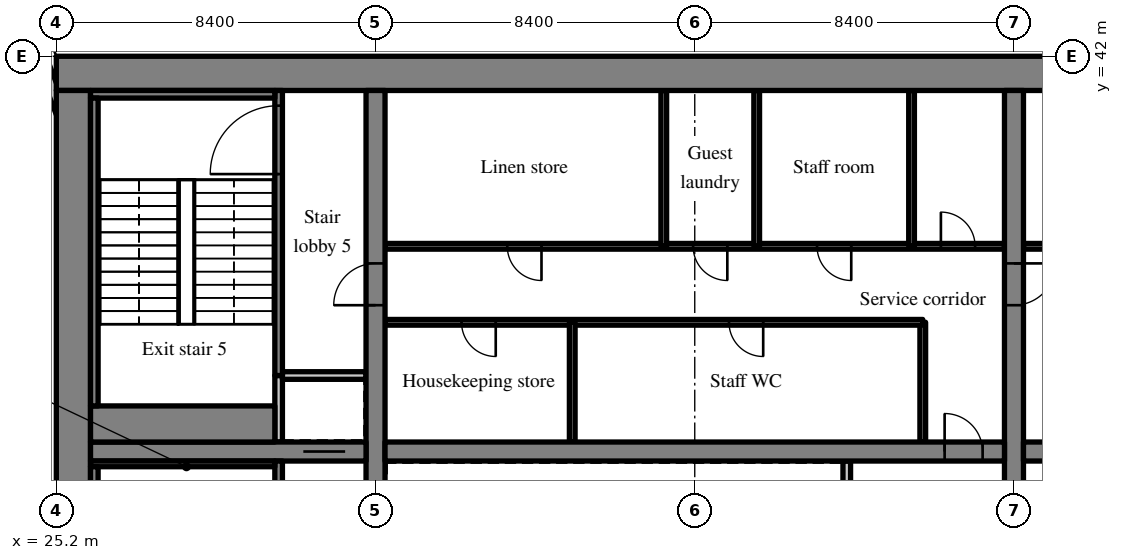
"""IFC4 building model, lengths in metres.
Left out: names, types, materials, properties, quantities, classifications, styles, units other than length and angle.
Written with IfcOpenShell. Run it as: python <this file> out.ifc"""

import sys

from ifc_helpers import new_model, si_unit, direction, frame, frame_2d, origin, place, context, subcontext, project, spatial, rectangle, extrude, source, transform, mapped, element, fill, save


model = new_model("IFC4")
c1 = context("Model", 3, precision=1e-05, world=origin(), true_north=direction((0.0, 1.0)))
c2 = subcontext(c1, "Body", "Model", "MODEL_VIEW")
j1 = project(units=[si_unit("LENGTHUNIT", "METRE"), si_unit("PLANEANGLEUNIT", "RADIAN")], contexts=[c1])
p1 = place(None, origin())
s1 = spatial("IfcSite", under=j1, at=p1, CompositionType="ELEMENT")
p2 = place(p1, origin())
s2 = spatial("IfcBuilding", under=s1, at=p2, CompositionType="ELEMENT")
p3 = place(p2, frame((0.0, 0.0, 133.2)))
s3 = spatial("IfcBuildingStorey", under=s2, at=p3, CompositionType="ELEMENT", Elevation=133.2)
m1 = source(origin(), c2, "Body", "SweptSolid", [
    extrude(rectangle(XDim=50.4, YDim=0.9, at=frame_2d((25.2, 0.0))), origin(), (0.0, 0.0, 1.0), 3.52),
])
p4 = place(p3, frame((25.2, 41.55, 0.0), z_axis=(0.0, 0.0, 1.0), x_axis=(1.0, 0.0, 0.0)))
e1 = element("IfcWall", 1, at=p4, inside=s3, PredefinedType="SHEAR", context=c2, shape_type="MappedRepresentation", body=[
    mapped(m1, transform((0.0, 0.0, 0.0), scale=1.0)),
])
m2 = source(origin(), c2, "Body", "SweptSolid", [
    extrude(rectangle(XDim=18.2, YDim=0.9, at=frame_2d((9.1, 0.0))), origin(), (0.0, 0.0, 1.0), 3.52),
])
p5 = place(p3, frame((25.65, 22.9, 0.0), z_axis=(0.0, 0.0, 1.0), x_axis=(0.0, 1.0, 0.0)))
e2 = element("IfcWall", 2, at=p5, inside=s3, PredefinedType="SHEAR", context=c2, shape_type="MappedRepresentation", body=[
    mapped(m2, transform((0.0, 0.0, 0.0), scale=1.0)),
])
m3 = source(origin(), c2, "Body", "SweptSolid", [
    extrude(rectangle(XDim=18.2, YDim=0.5, at=frame_2d((9.1, 0.0))), origin(), (0.0, 0.0, 1.0), 3.52),
])
p6 = place(p3, frame((33.6, 22.9, 0.0), z_axis=(0.0, 0.0, 1.0), x_axis=(0.0, 1.0, 0.0)))
e3 = element("IfcWall", 3, at=p6, inside=s3, PredefinedType="SHEAR", context=c2, shape_type="MappedRepresentation", body=[
    mapped(m3, transform((0.0, 0.0, 0.0), scale=1.0)),
])
m4 = source(origin(), c2, "Body", "SweptSolid", [
    extrude(rectangle(XDim=1.1, YDim=2.1, at=frame_2d((0.55, 1.05))), frame((0.0, 0.26, 0.0), z_axis=(0.0, -1.0, 0.0), x_axis=(1.0, 0.0, 0.0)), (0.0, 0.0, 1.0), 0.52),
])
p7 = place(p6, frame((12.55, 0.0, 0.0)))
e4 = element("IfcOpeningElement", 4, at=p7, cuts=e3, PredefinedType="OPENING", context=c2, shape_type="MappedRepresentation", body=[
    mapped(m4, transform((0.0, 0.0, 0.0), scale=1.0)),
])
p8 = place(p3, frame((50.4, 22.9, 0.0), z_axis=(0.0, 0.0, 1.0), x_axis=(0.0, 1.0, 0.0)))
e5 = element("IfcWall", 5, at=p8, inside=s3, PredefinedType="SHEAR", context=c2, shape_type="MappedRepresentation", body=[
    mapped(m3, transform((0.0, 0.0, 0.0), scale=1.0)),
])
p9 = place(p8, frame((12.55, 0.0, 0.0)))
e6 = element("IfcOpeningElement", 6, at=p9, cuts=e5, PredefinedType="OPENING", context=c2, shape_type="MappedRepresentation", body=[
    mapped(m4, transform((0.0, 0.0, 0.0), scale=1.0)),
])
m5 = source(origin(), c2, "Body", "SweptSolid", [
    extrude(rectangle(XDim=7.25, YDim=0.5, at=frame_2d((3.625, 0.0))), origin(), (0.0, 0.0, 1.0), 3.52),
])
p10 = place(p3, frame((26.1, 31.6, 0.0), z_axis=(0.0, 0.0, 1.0), x_axis=(1.0, 0.0, 0.0)))
e7 = element("IfcWall", 7, at=p10, inside=s3, PredefinedType="SHEAR", context=c2, shape_type="MappedRepresentation", body=[
    mapped(m5, transform((0.0, 0.0, 0.0), scale=1.0)),
])
p11 = place(p10, frame((5.6, 0.0, 0.0)))
e8 = element("IfcOpeningElement", 8, at=p11, cuts=e7, PredefinedType="OPENING", context=c2, shape_type="MappedRepresentation", body=[
    mapped(m4, transform((0.0, 0.0, 0.0), scale=1.0)),
])
m6 = source(origin(), c2, "Body", "SweptSolid", [
    extrude(rectangle(XDim=16.3, YDim=0.5, at=frame_2d((8.15, 0.0))), origin(), (0.0, 0.0, 1.0), 3.52),
])
p12 = place(p3, frame((33.85, 31.6, 0.0), z_axis=(0.0, 0.0, 1.0), x_axis=(1.0, 0.0, 0.0)))
e9 = element("IfcWall", 9, at=p12, inside=s3, PredefinedType="SHEAR", context=c2, shape_type="MappedRepresentation", body=[
    mapped(m6, transform((0.0, 0.0, 0.0), scale=1.0)),
])
m7 = source(origin(), c2, "Body", "SweptSolid", [
    extrude(rectangle(XDim=1.0, YDim=2.1, at=frame_2d((0.5, 1.05))), frame((0.0, 0.26, 0.0), z_axis=(0.0, -1.0, 0.0), x_axis=(1.0, 0.0, 0.0)), (0.0, 0.0, 1.0), 0.52),
])
p13 = place(p12, frame((14.725, 0.0, 0.0)))
e10 = element("IfcOpeningElement", 10, at=p13, cuts=e9, PredefinedType="OPENING", context=c2, shape_type="MappedRepresentation", body=[
    mapped(m7, transform((0.0, 0.0, 0.0), scale=1.0)),
])
m8 = source(origin(), c2, "Body", "SweptSolid", [
    extrude(rectangle(XDim=16.3, YDim=0.5, at=frame_2d((8.15, 0.0))), origin(), (0.0, 0.0, 1.0), 3.52),
])
p14 = place(p3, frame((50.65, 31.6, 0.0), z_axis=(0.0, 0.0, 1.0), x_axis=(1.0, 0.0, 0.0)))
e11 = element("IfcWall", 11, at=p14, inside=s3, PredefinedType="SHEAR", context=c2, shape_type="MappedRepresentation", body=[
    mapped(m8, transform((0.0, 0.0, 0.0), scale=1.0)),
])
p15 = place(p14, frame((0.575, 0.0, 0.0)))
e12 = element("IfcOpeningElement", 12, at=p15, cuts=e11, PredefinedType="OPENING", context=c2, shape_type="MappedRepresentation", body=[
    mapped(m7, transform((0.0, 0.0, 0.0), scale=1.0)),
])
m9 = source(origin(), c2, "Body", "SweptSolid", [
    extrude(rectangle(XDim=3.559, YDim=0.3, at=frame_2d((1.78, 0.0))), origin(), (0.0, 0.0, 1.0), 3.52),
])
p16 = place(p3, frame((25.55, 39.969, 0.0), z_axis=(0.0, 0.0, 1.0), x_axis=(-0.35779745313, 0.933799219604, 0.0)))
e13 = element("IfcWall", 13, at=p16, inside=s3, PredefinedType="SOLIDWALL", context=c2, shape_type="MappedRepresentation", body=[
    mapped(m9, transform((0.0, 0.0, 0.0), scale=1.0)),
])
m10 = source(origin(), c2, "Body", "SweptSolid", [
    extrude(rectangle(XDim=1.5, YDim=2.0, at=frame_2d((0.75, 1.0))), frame((0.0, 0.16, 0.0), z_axis=(0.0, -1.0, 0.0), x_axis=(1.0, 0.0, 0.0)), (0.0, 0.0, 1.0), 0.32),
])
p17 = place(p16, frame((1.903, 0.0, 0.9)))
e14 = element("IfcOpeningElement", 14, at=p17, cuts=e13, PredefinedType="OPENING", context=c2, shape_type="MappedRepresentation", body=[
    mapped(m10, transform((0.0, 0.0, 0.0), scale=1.0)),
])
m11 = source(origin(), c2, "Body", "SweptSolid", [
    extrude(rectangle(XDim=2.55, YDim=0.2, at=frame_2d((1.275, 0.0))), origin(), (0.0, 0.0, 1.0), 3.52),
])
p18 = place(p3, frame((46.0, 28.8, 0.0), z_axis=(0.0, 0.0, 1.0), x_axis=(0.0, 1.0, 0.0)))
e15 = element("IfcWall", 15, at=p18, inside=s3, PredefinedType="SOLIDWALL", context=c2, shape_type="MappedRepresentation", body=[
    mapped(m11, transform((0.0, 0.0, 0.0), scale=1.0)),
])
m12 = source(origin(), c2, "Body", "SweptSolid", [
    extrude(rectangle(XDim=3.15, YDim=0.15, at=frame_2d((1.575, 0.0))), origin(), (0.0, 0.0, 1.0), 3.52),
])
p19 = place(p3, frame((48.0, 31.85, 0.0), z_axis=(0.0, 0.0, 1.0), x_axis=(0.0, 1.0, 0.0)))
e16 = element("IfcWall", 16, at=p19, inside=s3, PredefinedType="PARTITIONING", context=c2, shape_type="MappedRepresentation", body=[
    mapped(m12, transform((0.0, 0.0, 0.0), scale=1.0)),
])
m13 = source(origin(), c2, "Body", "SweptSolid", [
    extrude(rectangle(XDim=14.15, YDim=0.15, at=frame_2d((7.075, 0.0))), origin(), (0.0, 0.0, 1.0), 3.52),
])
p20 = place(p3, frame((33.85, 35.0, 0.0), z_axis=(0.0, 0.0, 1.0), x_axis=(1.0, 0.0, 0.0)))
e17 = element("IfcWall", 17, at=p20, inside=s3, PredefinedType="PARTITIONING", context=c2, shape_type="MappedRepresentation", body=[
    mapped(m13, transform((0.0, 0.0, 0.0), scale=1.0)),
])
m14 = source(origin(), c2, "Body", "SweptSolid", [
    extrude(rectangle(XDim=0.9, YDim=2.1, at=frame_2d((0.45, 1.05))), frame((0.0, 0.085, 0.0), z_axis=(0.0, -1.0, 0.0), x_axis=(1.0, 0.0, 0.0)), (0.0, 0.0, 1.0), 0.17),
])
p21 = place(p20, frame((2.013, 0.0, 0.0)))
e18 = element("IfcOpeningElement", 18, at=p21, cuts=e17, PredefinedType="OPENING", context=c2, shape_type="MappedRepresentation", body=[
    mapped(m14, transform((0.0, 0.0, 0.0), scale=1.0)),
])
p22 = place(p20, frame((9.051, 0.0, 0.0)))
e19 = element("IfcOpeningElement", 19, at=p22, cuts=e17, PredefinedType="OPENING", context=c2, shape_type="MappedRepresentation", body=[
    mapped(m14, transform((0.0, 0.0, 0.0), scale=1.0)),
])
m15 = source(origin(), c2, "Body", "SweptSolid", [
    extrude(rectangle(XDim=16.3, YDim=0.15, at=frame_2d((8.15, 0.0))), origin(), (0.0, 0.0, 1.0), 3.52),
])
p23 = place(p3, frame((33.85, 37.0, 0.0), z_axis=(0.0, 0.0, 1.0), x_axis=(1.0, 0.0, 0.0)))
e20 = element("IfcWall", 20, at=p23, inside=s3, PredefinedType="PARTITIONING", context=c2, shape_type="MappedRepresentation", body=[
    mapped(m15, transform((0.0, 0.0, 0.0), scale=1.0)),
])
p24 = place(p23, frame((3.217, 0.0, 0.0)))
e21 = element("IfcOpeningElement", 21, at=p24, cuts=e20, PredefinedType="OPENING", context=c2, shape_type="MappedRepresentation", body=[
    mapped(m14, transform((0.0, 0.0, 0.0), scale=1.0)),
])
p25 = place(p23, frame((8.107, 0.0, 0.0)))
e22 = element("IfcOpeningElement", 22, at=p25, cuts=e20, PredefinedType="OPENING", context=c2, shape_type="MappedRepresentation", body=[
    mapped(m14, transform((0.0, 0.0, 0.0), scale=1.0)),
])
p26 = place(p23, frame((11.368, 0.0, 0.0)))
e23 = element("IfcOpeningElement", 23, at=p26, cuts=e20, PredefinedType="OPENING", context=c2, shape_type="MappedRepresentation", body=[
    mapped(m14, transform((0.0, 0.0, 0.0), scale=1.0)),
])
p27 = place(p23, frame((14.627, 0.0, 0.0)))
e24 = element("IfcOpeningElement", 24, at=p27, cuts=e20, PredefinedType="OPENING", context=c2, shape_type="MappedRepresentation", body=[
    mapped(m14, transform((0.0, 0.0, 0.0), scale=1.0)),
])
p28 = place(p3, frame((38.776, 31.85, 0.0), z_axis=(0.0, 0.0, 1.0), x_axis=(0.0, 1.0, 0.0)))
e25 = element("IfcWall", 25, at=p28, inside=s3, PredefinedType="PARTITIONING", context=c2, shape_type="MappedRepresentation", body=[
    mapped(m12, transform((0.0, 0.0, 0.0), scale=1.0)),
])
m16 = source(origin(), c2, "Body", "SweptSolid", [
    extrude(rectangle(XDim=4.1, YDim=0.15, at=frame_2d((2.05, 0.0))), origin(), (0.0, 0.0, 1.0), 3.52),
])
for number, where, z_axis, x_axis in (
    (26, (41.185, 37.0, 0.0), (0.0, 0.0, 1.0), (0.0, 1.0, 0.0)),
    (27, (43.63, 37.0, 0.0), (0.0, 0.0, 1.0), (0.0, 1.0, 0.0)),
    (28, (47.705, 37.0, 0.0), (0.0, 0.0, 1.0), (0.0, 1.0, 0.0)),
):
    element("IfcWall", number, at=place(p3, frame(where, z_axis=z_axis, x_axis=x_axis)), inside=s3, PredefinedType="PARTITIONING", context=c2, shape_type="MappedRepresentation", body=[
        mapped(m16, transform((0.0, 0.0, 0.0), scale=1.0)),
    ])
m17 = source(origin(), c2, "Body", "SweptSolid", [
    extrude(rectangle(XDim=16.3, YDim=0.15, at=frame_2d((8.15, 0.0))), origin(), (0.0, 0.0, 1.0), 3.52),
])
p29 = place(p3, frame((66.95, 37.0, 0.0), z_axis=(0.0, 0.0, 1.0), x_axis=(-1.0, 0.0, 0.0)))
e29 = element("IfcWall", 29, at=p29, inside=s3, PredefinedType="PARTITIONING", context=c2, shape_type="MappedRepresentation", body=[
    mapped(m17, transform((0.0, 0.0, 0.0), scale=1.0)),
])
p30 = place(p29, frame((0.773, 0.0, 0.0)))
e30 = element("IfcOpeningElement", 30, at=p30, cuts=e29, PredefinedType="OPENING", context=c2, shape_type="MappedRepresentation", body=[
    mapped(m14, transform((0.0, 0.0, 0.0), scale=1.0)),
])
p31 = place(p29, frame((3.625, 0.0, 0.0)))
e31 = element("IfcOpeningElement", 31, at=p31, cuts=e29, PredefinedType="OPENING", context=c2, shape_type="MappedRepresentation", body=[
    mapped(m14, transform((0.0, 0.0, 0.0), scale=1.0)),
])
p32 = place(p29, frame((9.33, 0.0, 0.0)))
e32 = element("IfcOpeningElement", 32, at=p32, cuts=e29, PredefinedType="OPENING", context=c2, shape_type="MappedRepresentation", body=[
    mapped(m14, transform((0.0, 0.0, 0.0), scale=1.0)),
])
p33 = place(p29, frame((14.627, 0.0, 0.0)))
e33 = element("IfcOpeningElement", 33, at=p33, cuts=e29, PredefinedType="OPENING", context=c2, shape_type="MappedRepresentation", body=[
    mapped(m14, transform((0.0, 0.0, 0.0), scale=1.0)),
])
m18 = source(origin(), c2, "Body", "SweptSolid", [
    extrude(rectangle(XDim=8.45, YDim=0.2, at=frame_2d((4.225, 0.0))), origin(), (0.0, 0.0, 1.0), 3.52),
])
p34 = place(p3, frame((31.05, 22.9, 0.0), z_axis=(0.0, 0.0, 1.0), x_axis=(0.0, 1.0, 0.0)))
e34 = element("IfcWall", 34, at=p34, inside=s3, PredefinedType="SOLIDWALL", context=c2, shape_type="MappedRepresentation", body=[
    mapped(m18, transform((0.0, 0.0, 0.0), scale=1.0)),
])
m19 = source(origin(), c2, "Body", "SweptSolid", [
    extrude(rectangle(XDim=1.2, YDim=2.1, at=frame_2d((0.6, 1.05))), frame((0.0, 0.11, 0.0), z_axis=(0.0, -1.0, 0.0), x_axis=(1.0, 0.0, 0.0)), (0.0, 0.0, 1.0), 0.22),
])
p35 = place(p34, frame((6.6, 0.0, 0.0)))
e35 = element("IfcOpeningElement", 35, at=p35, cuts=e34, PredefinedType="OPENING", context=c2, shape_type="MappedRepresentation", body=[
    mapped(m19, transform((0.0, 0.0, 0.0), scale=1.0)),
])
m20 = source(origin(), c2, "Body", "SweptSolid", [
    extrude(rectangle(XDim=1.75, YDim=0.2, at=frame_2d((0.875, 0.0))), origin(), (0.0, 0.0, 1.0), 3.52),
])
p36 = place(p3, frame((31.05, 31.85, 0.0), z_axis=(0.0, 0.0, 1.0), x_axis=(0.0, 1.0, 0.0)))
e36 = element("IfcWall", 36, at=p36, inside=s3, PredefinedType="SOLIDWALL", context=c2, shape_type="MappedRepresentation", body=[
    mapped(m20, transform((0.0, 0.0, 0.0), scale=1.0)),
])
m21 = source(origin(), c2, "Body", "SweptSolid", [
    extrude(rectangle(XDim=2.2, YDim=0.2, at=frame_2d((1.1, 0.0))), origin(), (0.0, 0.0, 1.0), 3.52),
])
p37 = place(p3, frame((31.15, 33.6, 0.0), z_axis=(0.0, 0.0, 1.0), x_axis=(1.0, 0.0, 0.0)))
e37 = element("IfcWall", 37, at=p37, inside=s3, PredefinedType="SOLIDWALL", context=c2, shape_type="MappedRepresentation", body=[
    mapped(m21, transform((0.0, 0.0, 0.0), scale=1.0)),
])
m22 = source(origin(), c2, "Body", "SweptSolid", [
    extrude(rectangle(XDim=7.5, YDim=0.2, at=frame_2d((3.75, 0.0))), origin(), (0.0, 0.0, 1.0), 3.52),
])
p38 = place(p3, frame((31.05, 33.6, 0.0), z_axis=(0.0, 0.0, 1.0), x_axis=(0.0, 1.0, 0.0)))
e38 = element("IfcWall", 38, at=p38, inside=s3, PredefinedType="SOLIDWALL", context=c2, shape_type="MappedRepresentation", body=[
    mapped(m22, transform((0.0, 0.0, 0.0), scale=1.0)),
])
m23 = source(origin(), c2, "Body", "SweptSolid", [
    extrude(rectangle(XDim=1.8, YDim=2.1, at=frame_2d((0.9, 1.05))), frame((0.0, 0.11, 0.0), z_axis=(0.0, -1.0, 0.0), x_axis=(1.0, 0.0, 0.0)), (0.0, 0.0, 1.0), 0.22),
])
p39 = place(p38, frame((5.3, 0.0, 0.0)))
e39 = element("IfcOpeningElement", 39, at=p39, cuts=e38, PredefinedType="OPENING", context=c2, shape_type="MappedRepresentation", body=[
    mapped(m23, transform((0.0, 0.0, 0.0), scale=1.0)),
])
m24 = source(origin(), c2, "Body", "SweptSolid", [
    extrude(rectangle(XDim=4.85, YDim=0.15, at=frame_2d((2.425, 0.0))), origin(), (0.0, 0.0, 1.0), 3.52),
])
p40 = place(p3, frame((26.1, 31.275, 0.0), z_axis=(0.0, 0.0, 1.0), x_axis=(1.0, 0.0, 0.0)))
e40 = element("IfcWall", 40, at=p40, inside=s3, PredefinedType="SOLIDWALL", context=c2, shape_type="MappedRepresentation", body=[
    mapped(m24, transform((0.0, 0.0, 0.0), scale=1.0)),
])
m25 = source(origin(), c2, "Body", "SweptSolid", [
    extrude(rectangle(XDim=8.1, YDim=0.2, at=frame_2d((4.05, 0.0))), origin(), (0.0, 0.0, 1.0), 3.52),
])
p41 = place(p3, frame((26.2, 23.1, 0.0), z_axis=(0.0, 0.0, 1.0), x_axis=(0.0, 1.0, 0.0)))
e41 = element("IfcWall", 41, at=p41, inside=s3, PredefinedType="SOLIDWALL", context=c2, shape_type="MappedRepresentation", body=[
    mapped(m25, transform((0.0, 0.0, 0.0), scale=1.0)),
])
m26 = source(origin(), c2, "Body", "SweptSolid", [
    extrude(rectangle(XDim=4.85, YDim=0.2, at=frame_2d((2.425, 0.0))), origin(), (0.0, 0.0, 1.0), 3.52),
])
p42 = place(p3, frame((26.1, 41.0, 0.0), z_axis=(0.0, 0.0, 1.0), x_axis=(1.0, 0.0, 0.0)))
e42 = element("IfcWall", 42, at=p42, inside=s3, PredefinedType="SOLIDWALL", context=c2, shape_type="MappedRepresentation", body=[
    mapped(m26, transform((0.0, 0.0, 0.0), scale=1.0)),
])
m27 = source(origin(), c2, "Body", "SweptSolid", [
    extrude(rectangle(XDim=4.85, YDim=0.95, at=frame_2d((2.425, 0.0))), origin(), (0.0, 0.0, 1.0), 3.52),
])
p43 = place(p3, frame((26.1, 32.325, 0.0), z_axis=(0.0, 0.0, 1.0), x_axis=(1.0, 0.0, 0.0)))
e43 = element("IfcWall", 43, at=p43, inside=s3, PredefinedType="SOLIDWALL", context=c2, shape_type="MappedRepresentation", body=[
    mapped(m27, transform((0.0, 0.0, 0.0), scale=1.0)),
])
p44 = place(p3, frame((26.2, 32.8, 0.0), z_axis=(0.0, 0.0, 1.0), x_axis=(0.0, 1.0, 0.0)))
e44 = element("IfcWall", 44, at=p44, inside=s3, PredefinedType="SOLIDWALL", context=c2, shape_type="MappedRepresentation", body=[
    mapped(m25, transform((0.0, 0.0, 0.0), scale=1.0)),
])
m28 = source(origin(), c2, "Body", "SweptSolid", [
    extrude(rectangle(XDim=1.0, YDim=2.1, at=frame_2d((0.5, 1.05))), frame((0.0, 0.025, 0.0), z_axis=(0.0, -1.0, 0.0), x_axis=(1.0, 0.0, 0.0)), (0.0, 0.0, 1.0), 0.05),
])
p45 = place(p13, origin())
e45 = element("IfcDoor", 45, at=p45, inside=s3, OperationType="SINGLE_SWING_LEFT", PredefinedType="DOOR", context=c2, shape_type="MappedRepresentation", body=[
    mapped(m28, transform((0.0, 0.0, 0.0), scale=1.0)),
])
fill(e10, e45)
m29 = source(origin(), c2, "Body", "SweptSolid", [
    extrude(rectangle(XDim=0.9, YDim=2.1, at=frame_2d((0.45, 1.05))), frame((0.0, 0.025, 0.0), z_axis=(0.0, -1.0, 0.0), x_axis=(1.0, 0.0, 0.0)), (0.0, 0.0, 1.0), 0.05),
])
p46 = place(p21, origin())
e46 = element("IfcDoor", 46, at=p46, inside=s3, OperationType="SINGLE_SWING_RIGHT", PredefinedType="DOOR", context=c2, shape_type="MappedRepresentation", body=[
    mapped(m29, transform((0.0, 0.0, 0.0), scale=1.0)),
])
fill(e18, e46)
p47 = place(p22, origin())
e47 = element("IfcDoor", 47, at=p47, inside=s3, OperationType="SINGLE_SWING_RIGHT", PredefinedType="DOOR", context=c2, shape_type="MappedRepresentation", body=[
    mapped(m29, transform((0.0, 0.0, 0.0), scale=1.0)),
])
fill(e19, e47)
p48 = place(p24, origin())
e48 = element("IfcDoor", 48, at=p48, inside=s3, OperationType="SINGLE_SWING_RIGHT", PredefinedType="DOOR", context=c2, shape_type="MappedRepresentation", body=[
    mapped(m29, transform((0.0, 0.0, 0.0), scale=1.0)),
])
fill(e21, e48)
p49 = place(p25, origin())
e49 = element("IfcDoor", 49, at=p49, inside=s3, OperationType="SINGLE_SWING_RIGHT", PredefinedType="DOOR", context=c2, shape_type="MappedRepresentation", body=[
    mapped(m29, transform((0.0, 0.0, 0.0), scale=1.0)),
])
fill(e22, e49)
p50 = place(p26, origin())
e50 = element("IfcDoor", 50, at=p50, inside=s3, OperationType="SINGLE_SWING_RIGHT", PredefinedType="DOOR", context=c2, shape_type="MappedRepresentation", body=[
    mapped(m29, transform((0.0, 0.0, 0.0), scale=1.0)),
])
fill(e23, e50)
p51 = place(p27, origin())
e51 = element("IfcDoor", 51, at=p51, inside=s3, OperationType="SINGLE_SWING_LEFT", PredefinedType="DOOR", context=c2, shape_type="MappedRepresentation", body=[
    mapped(m29, transform((0.0, 0.0, 0.0), scale=1.0)),
])
fill(e24, e51)
m30 = source(origin(), c2, "Body", "SweptSolid", [
    extrude(rectangle(XDim=1.1, YDim=2.1, at=frame_2d((0.55, 1.05))), frame((0.0, 0.025, 0.0), z_axis=(0.0, -1.0, 0.0), x_axis=(1.0, 0.0, 0.0)), (0.0, 0.0, 1.0), 0.05),
])
p52 = place(p11, origin())
e52 = element("IfcDoor", 52, at=p52, inside=s3, OperationType="SLIDING_TO_RIGHT", PredefinedType="DOOR", context=c2, shape_type="MappedRepresentation", body=[
    mapped(m30, transform((0.0, 0.0, 0.0), scale=1.0)),
])
fill(e8, e52)
m31 = source(origin(), c2, "Body", "SweptSolid", [
    extrude(rectangle(XDim=1.8, YDim=2.1, at=frame_2d((0.9, 1.05))), frame((0.0, 0.025, 0.0), z_axis=(0.0, -1.0, 0.0), x_axis=(1.0, 0.0, 0.0)), (0.0, 0.0, 1.0), 0.05),
])
p53 = place(p39, origin())
e53 = element("IfcDoor", 53, at=p53, inside=s3, OperationType="SINGLE_SWING_LEFT", PredefinedType="DOOR", context=c2, shape_type="MappedRepresentation", body=[
    mapped(m31, transform((0.0, 0.0, 0.0), scale=1.0)),
])
fill(e39, e53)
p54 = place(p7, origin())
e54 = element("IfcDoor", 54, at=p54, inside=s3, OperationType="SINGLE_SWING_LEFT", PredefinedType="DOOR", context=c2, shape_type="MappedRepresentation", body=[
    mapped(m30, transform((0.0, 0.0, 0.0), scale=1.0)),
])
fill(e4, e54)
p55 = place(p9, origin())
e55 = element("IfcDoor", 55, at=p55, inside=s3, OperationType="SINGLE_SWING_RIGHT", PredefinedType="DOOR", context=c2, shape_type="MappedRepresentation", body=[
    mapped(m30, transform((0.0, 0.0, 0.0), scale=1.0)),
])
fill(e6, e55)
save(model, sys.argv[1])
